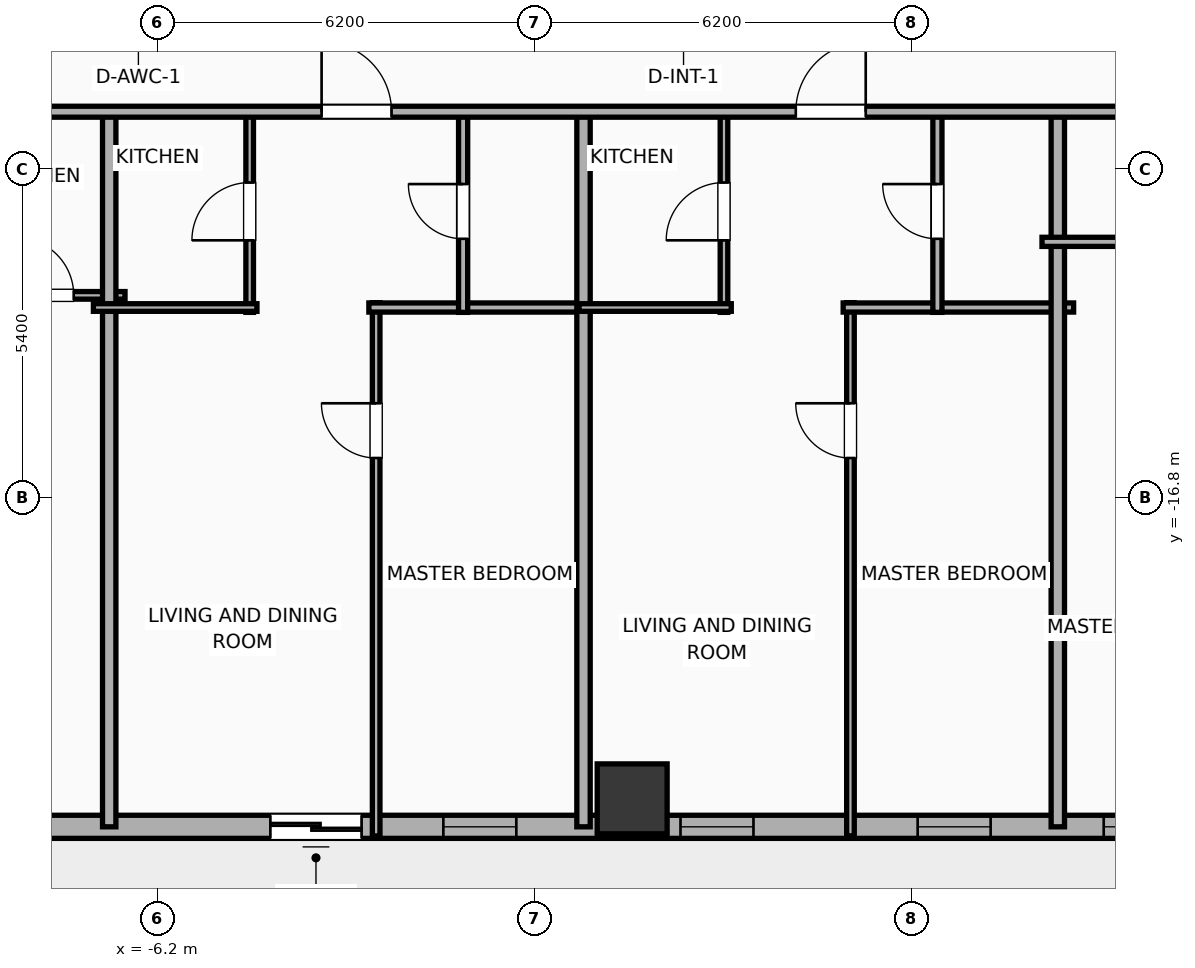
"""IFC4 building model, lengths in metres.
Left out: names, types, materials, properties, quantities, classifications, styles, units other than length and angle.
Written with IfcOpenShell. Run it as: python <this file> out.ifc"""

import sys

from ifc_helpers import new_model, si_unit, direction, frame, frame_2d, origin, origin_2d, place, context, subcontext, project, spatial, rectangle, hollow_rectangle, extrude, element, fill, save


model = new_model("IFC4")
c1 = context("Model", 3, precision=1e-05, world=origin(), true_north=direction((0.0, 1.0)))
c2 = subcontext(c1, "Body", "Model", "MODEL_VIEW")
j1 = project(units=[si_unit("LENGTHUNIT", "METRE"), si_unit("PLANEANGLEUNIT", "RADIAN")], contexts=[c1])
p1 = place(None, origin())
s1 = spatial("IfcSite", under=j1, at=p1, CompositionType="ELEMENT")
p2 = place(p1, origin())
s2 = spatial("IfcBuilding", under=s1, at=p2, CompositionType="ELEMENT")
p3 = place(p2, frame((0.0, 0.0, 26.0)))
s3 = spatial("IfcBuildingStorey", under=s2, at=p3, CompositionType="ELEMENT", Elevation=26.0)
p4 = place(p3, frame((1.6, -21.75, -0.25), z_axis=(0.0, 0.0, 1.0), x_axis=(1.0, 0.0, 0.0)))
e1 = element("IfcColumn", 1, at=p4, inside=s3, PredefinedType="COLUMN", context=c2, shape_type="SweptSolid", body=[
    extrude(hollow_rectangle(XDim=1.15, YDim=1.15, WallThickness=0.04, at=origin_2d()), origin(), (0.0, 0.0, 1.0), 4.15),
])
p5 = place(p3, frame((22.381, -22.21, 0.0), z_axis=(0.0, 0.0, 1.0), x_axis=(-1.0, 0.0, 0.0)))
e2 = element("IfcWall", 2, at=p5, inside=s3, PredefinedType="ELEMENTEDWALL", context=c2, shape_type="SweptSolid", body=[
    extrude(rectangle(XDim=51.963, YDim=0.38, at=frame_2d((25.981, 0.0))), origin(), (0.0, 0.0, 1.0), 2.54),
])
p6 = place(p5, frame((25.231, 0.0, 0.0)))
e3 = element("IfcOpeningElement", 3, at=p6, cuts=e2, PredefinedType="OPENING", context=c2, shape_type="SweptSolid", body=[
    extrude(rectangle(XDim=1.5, YDim=2.05, at=frame_2d((0.75, 1.025))), frame((0.0, 0.2, 0.0), z_axis=(0.0, -1.0, 0.0), x_axis=(1.0, 0.0, 0.0)), (0.0, 0.0, 1.0), 0.4),
])
p7 = place(p5, frame((6.61, 0.0, 0.75)))
e4 = element("IfcOpeningElement", 4, at=p7, cuts=e2, PredefinedType="OPENING", context=c2, shape_type="SweptSolid", body=[
    extrude(rectangle(XDim=2.4, YDim=1.63, at=frame_2d((1.2, 0.815))), frame((0.0, 0.2, 0.0), z_axis=(0.0, -1.0, 0.0), x_axis=(1.0, 0.0, 0.0)), (0.0, 0.0, 1.0), 0.4),
])
p8 = place(p5, frame((49.132, 0.0, 0.75)))
e5 = element("IfcOpeningElement", 5, at=p8, cuts=e2, PredefinedType="OPENING", context=c2, shape_type="SweptSolid", body=[
    extrude(rectangle(XDim=1.2, YDim=1.63, at=frame_2d((0.6, 0.815))), frame((0.0, 0.2, 0.0), z_axis=(0.0, -1.0, 0.0), x_axis=(1.0, 0.0, 0.0)), (0.0, 0.0, 1.0), 0.4),
])
p9 = place(p5, frame((46.086, 0.0, 0.75)))
e6 = element("IfcOpeningElement", 6, at=p9, cuts=e2, PredefinedType="OPENING", context=c2, shape_type="SweptSolid", body=[
    extrude(rectangle(XDim=1.2, YDim=1.63, at=frame_2d((0.6, 0.815))), frame((0.0, 0.2, 0.0), z_axis=(0.0, -1.0, 0.0), x_axis=(1.0, 0.0, 0.0)), (0.0, 0.0, 1.0), 0.4),
])
p10 = place(p5, frame((42.426, 0.0, 0.75)))
e7 = element("IfcOpeningElement", 7, at=p10, cuts=e2, PredefinedType="OPENING", context=c2, shape_type="SweptSolid", body=[
    extrude(rectangle(XDim=1.2, YDim=1.63, at=frame_2d((0.6, 0.815))), frame((0.0, 0.2, 0.0), z_axis=(0.0, -1.0, 0.0), x_axis=(1.0, 0.0, 0.0)), (0.0, 0.0, 1.0), 0.4),
])
p11 = place(p5, frame((38.286, 0.0, 0.75)))
e8 = element("IfcOpeningElement", 8, at=p11, cuts=e2, PredefinedType="OPENING", context=c2, shape_type="SweptSolid", body=[
    extrude(rectangle(XDim=1.2, YDim=1.63, at=frame_2d((0.6, 0.815))), frame((0.0, 0.2, 0.0), z_axis=(0.0, -1.0, 0.0), x_axis=(1.0, 0.0, 0.0)), (0.0, 0.0, 1.0), 0.4),
])
p12 = place(p5, frame((35.219, 0.0, 0.75)))
e9 = element("IfcOpeningElement", 9, at=p12, cuts=e2, PredefinedType="OPENING", context=c2, shape_type="SweptSolid", body=[
    extrude(rectangle(XDim=1.2, YDim=1.63, at=frame_2d((0.6, 0.815))), frame((0.0, 0.2, 0.0), z_axis=(0.0, -1.0, 0.0), x_axis=(1.0, 0.0, 0.0)), (0.0, 0.0, 1.0), 0.4),
])
p13 = place(p5, frame((32.039, 0.0, 0.75)))
e10 = element("IfcOpeningElement", 10, at=p13, cuts=e2, PredefinedType="OPENING", context=c2, shape_type="SweptSolid", body=[
    extrude(rectangle(XDim=1.2, YDim=1.63, at=frame_2d((0.6, 0.815))), frame((0.0, 0.2, 0.0), z_axis=(0.0, -1.0, 0.0), x_axis=(1.0, 0.0, 0.0)), (0.0, 0.0, 1.0), 0.4),
])
p14 = place(p5, frame((22.686, 0.0, 0.75)))
e11 = element("IfcOpeningElement", 11, at=p14, cuts=e2, PredefinedType="OPENING", context=c2, shape_type="SweptSolid", body=[
    extrude(rectangle(XDim=1.2, YDim=1.63, at=frame_2d((0.6, 0.815))), frame((0.0, 0.2, 0.0), z_axis=(0.0, -1.0, 0.0), x_axis=(1.0, 0.0, 0.0)), (0.0, 0.0, 1.0), 0.4),
])
p15 = place(p5, frame((18.786, 0.0, 0.75)))
e12 = element("IfcOpeningElement", 12, at=p15, cuts=e2, PredefinedType="OPENING", context=c2, shape_type="SweptSolid", body=[
    extrude(rectangle(XDim=1.2, YDim=1.63, at=frame_2d((0.6, 0.815))), frame((0.0, 0.2, 0.0), z_axis=(0.0, -1.0, 0.0), x_axis=(1.0, 0.0, 0.0)), (0.0, 0.0, 1.0), 0.4),
])
p16 = place(p5, frame((14.886, 0.0, 0.75)))
e13 = element("IfcOpeningElement", 13, at=p16, cuts=e2, PredefinedType="OPENING", context=c2, shape_type="SweptSolid", body=[
    extrude(rectangle(XDim=1.2, YDim=1.63, at=frame_2d((0.6, 0.815))), frame((0.0, 0.2, 0.0), z_axis=(0.0, -1.0, 0.0), x_axis=(1.0, 0.0, 0.0)), (0.0, 0.0, 1.0), 0.4),
])
p17 = place(p5, frame((11.826, 0.0, 0.75)))
e14 = element("IfcOpeningElement", 14, at=p17, cuts=e2, PredefinedType="OPENING", context=c2, shape_type="SweptSolid", body=[
    extrude(rectangle(XDim=1.2, YDim=1.63, at=frame_2d((0.6, 0.815))), frame((0.0, 0.2, 0.0), z_axis=(0.0, -1.0, 0.0), x_axis=(1.0, 0.0, 0.0)), (0.0, 0.0, 1.0), 0.4),
])
p18 = place(p5, frame((2.836, 0.0, 0.75)))
e15 = element("IfcOpeningElement", 15, at=p18, cuts=e2, PredefinedType="OPENING", context=c2, shape_type="SweptSolid", body=[
    extrude(rectangle(XDim=1.2, YDim=1.63, at=frame_2d((0.6, 0.815))), frame((0.0, 0.2, 0.0), z_axis=(0.0, -1.0, 0.0), x_axis=(1.0, 0.0, 0.0)), (0.0, 0.0, 1.0), 0.4),
])
p19 = place(p3, frame((-9.377, -13.47, 0.0), z_axis=(0.0, 0.0, 1.0), x_axis=(1.0, 0.0, 0.0)))
e16 = element("IfcWall", 16, at=p19, inside=s3, PredefinedType="PARTITIONING", context=c2, shape_type="SweptSolid", body=[
    extrude(rectangle(XDim=2.637, YDim=0.125, at=frame_2d((1.318, 0.0))), origin(), (0.0, 0.0, 1.0), 3.65),
])
p20 = place(p19, frame((0.844, 0.0, 0.0)))
e17 = element("IfcOpeningElement", 17, at=p20, cuts=e16, PredefinedType="OPENING", context=c2, shape_type="SweptSolid", body=[
    extrude(rectangle(XDim=0.95, YDim=2.05, at=frame_2d((0.475, 1.025))), frame((0.0, 0.073, 0.0), z_axis=(0.0, -1.0, 0.0), x_axis=(1.0, 0.0, 0.0)), (0.0, 0.0, 1.0), 0.145),
])
p21 = place(p3, frame((-7.0, -22.21, 0.0), z_axis=(0.0, 0.0, 1.0), x_axis=(0.0, 1.0, 0.0)))
e18 = element("IfcWall", 18, at=p21, inside=s3, PredefinedType="PARTITIONING", context=c2, shape_type="SweptSolid", body=[
    extrude(rectangle(XDim=11.84, YDim=0.22, at=frame_2d((5.92, 0.0))), origin(), (0.0, 0.0, 1.0), 3.65),
])
p22 = place(p3, frame((-2.61, -22.36, 0.0), z_axis=(0.0, 0.0, 1.0), x_axis=(0.0, 1.0, 0.0)))
e19 = element("IfcWall", 19, at=p22, inside=s3, PredefinedType="PARTITIONING", context=c2, shape_type="SweptSolid", body=[
    extrude(rectangle(XDim=8.77, YDim=0.125, at=frame_2d((4.385, 0.0))), origin(), (0.0, 0.0, 1.0), 3.65),
])
p23 = place(p22, frame((6.215, 0.0, 0.0)))
e20 = element("IfcOpeningElement", 20, at=p23, cuts=e19, PredefinedType="OPENING", context=c2, shape_type="SweptSolid", body=[
    extrude(rectangle(XDim=0.9, YDim=2.05, at=frame_2d((0.45, 1.025))), frame((0.0, 0.073, 0.0), z_axis=(0.0, -1.0, 0.0), x_axis=(1.0, 0.0, 0.0)), (0.0, 0.0, 1.0), 0.145),
])
p24 = place(p3, frame((-2.73, -13.67, 0.0), z_axis=(0.0, 0.0, 1.0), x_axis=(1.0, 0.0, 0.0)))
e21 = element("IfcWall", 21, at=p24, inside=s3, PredefinedType="PLUMBINGWALL", context=c2, shape_type="SweptSolid", body=[
    extrude(rectangle(XDim=3.605, YDim=0.15, at=frame_2d((1.802, 0.0))), origin(), (0.0, 0.0, 1.0), 3.65),
])
p25 = place(p3, frame((-4.69, -13.75, 0.0), z_axis=(0.0, 0.0, 1.0), x_axis=(0.0, 1.0, 0.0)))
e22 = element("IfcWall", 22, at=p25, inside=s3, PredefinedType="PARTITIONING", context=c2, shape_type="SweptSolid", body=[
    extrude(rectangle(XDim=3.32, YDim=0.125, at=frame_2d((1.66, 0.0))), origin(), (0.0, 0.0, 1.0), 3.65),
])
p26 = place(p25, frame((1.185, 0.0, 0.0)))
e23 = element("IfcOpeningElement", 23, at=p26, cuts=e22, PredefinedType="OPENING", context=c2, shape_type="SweptSolid", body=[
    extrude(rectangle(XDim=0.95, YDim=2.05, at=frame_2d((0.475, 1.025))), frame((0.0, 0.073, 0.0), z_axis=(0.0, -1.0, 0.0), x_axis=(1.0, 0.0, 0.0)), (0.0, 0.0, 1.0), 0.145),
])
p27 = place(p3, frame((-7.26, -13.67, 0.0), z_axis=(0.0, 0.0, 1.0), x_axis=(1.0, 0.0, 0.0)))
e24 = element("IfcWall", 24, at=p27, inside=s3, PredefinedType="PARTITIONING", context=c2, shape_type="SweptSolid", body=[
    extrude(rectangle(XDim=2.69, YDim=0.125, at=frame_2d((1.345, 0.0))), origin(), (0.0, 0.0, 1.0), 3.65),
])
p28 = place(p3, frame((-1.18, -13.75, 0.0), z_axis=(0.0, 0.0, 1.0), x_axis=(0.0, 1.0, 0.0)))
e25 = element("IfcWall", 25, at=p28, inside=s3, PredefinedType="PLUMBINGWALL", context=c2, shape_type="SweptSolid", body=[
    extrude(rectangle(XDim=3.32, YDim=0.15, at=frame_2d((1.66, 0.0))), origin(), (0.0, 0.0, 1.0), 3.65),
])
p29 = place(p28, frame((1.21, 0.0, 0.0)))
e26 = element("IfcOpeningElement", 26, at=p29, cuts=e25, PredefinedType="OPENING", context=c2, shape_type="SweptSolid", body=[
    extrude(rectangle(XDim=0.9, YDim=2.05, at=frame_2d((0.45, 1.025))), frame((0.0, 0.085, 0.0), z_axis=(0.0, -1.0, 0.0), x_axis=(1.0, 0.0, 0.0)), (0.0, 0.0, 1.0), 0.17),
])
p30 = place(p3, frame((0.8, -22.21, 0.0), z_axis=(0.0, 0.0, 1.0), x_axis=(0.0, 1.0, 0.0)))
e27 = element("IfcWall", 27, at=p30, inside=s3, PredefinedType="PARTITIONING", context=c2, shape_type="SweptSolid", body=[
    extrude(rectangle(XDim=11.84, YDim=0.22, at=frame_2d((5.92, 0.0))), origin(), (0.0, 0.0, 1.0), 3.65),
])
p31 = place(p3, frame((5.19, -22.36, 0.0), z_axis=(0.0, 0.0, 1.0), x_axis=(0.0, 1.0, 0.0)))
e28 = element("IfcWall", 28, at=p31, inside=s3, PredefinedType="PARTITIONING", context=c2, shape_type="SweptSolid", body=[
    extrude(rectangle(XDim=8.77, YDim=0.125, at=frame_2d((4.385, 0.0))), origin(), (0.0, 0.0, 1.0), 3.65),
])
p32 = place(p31, frame((6.215, 0.0, 0.0)))
e29 = element("IfcOpeningElement", 29, at=p32, cuts=e28, PredefinedType="OPENING", context=c2, shape_type="SweptSolid", body=[
    extrude(rectangle(XDim=0.9, YDim=2.05, at=frame_2d((0.45, 1.025))), frame((0.0, 0.073, 0.0), z_axis=(0.0, -1.0, 0.0), x_axis=(1.0, 0.0, 0.0)), (0.0, 0.0, 1.0), 0.145),
])
p33 = place(p3, frame((5.07, -13.67, 0.0), z_axis=(0.0, 0.0, 1.0), x_axis=(1.0, 0.0, 0.0)))
e30 = element("IfcWall", 30, at=p33, inside=s3, PredefinedType="PLUMBINGWALL", context=c2, shape_type="SweptSolid", body=[
    extrude(rectangle(XDim=3.79, YDim=0.15, at=frame_2d((1.895, 0.0))), origin(), (0.0, 0.0, 1.0), 3.65),
])
p34 = place(p3, frame((3.11, -13.75, 0.0), z_axis=(0.0, 0.0, 1.0), x_axis=(0.0, 1.0, 0.0)))
e31 = element("IfcWall", 31, at=p34, inside=s3, PredefinedType="PARTITIONING", context=c2, shape_type="SweptSolid", body=[
    extrude(rectangle(XDim=3.32, YDim=0.125, at=frame_2d((1.66, 0.0))), origin(), (0.0, 0.0, 1.0), 2.54),
])
p35 = place(p34, frame((1.185, 0.0, 0.0)))
e32 = element("IfcOpeningElement", 32, at=p35, cuts=e31, PredefinedType="OPENING", context=c2, shape_type="SweptSolid", body=[
    extrude(rectangle(XDim=0.95, YDim=2.05, at=frame_2d((0.475, 1.025))), frame((0.0, 0.073, 0.0), z_axis=(0.0, -1.0, 0.0), x_axis=(1.0, 0.0, 0.0)), (0.0, 0.0, 1.0), 0.145),
])
p36 = place(p3, frame((0.725, -13.67, 0.0), z_axis=(0.0, 0.0, 1.0), x_axis=(1.0, 0.0, 0.0)))
e33 = element("IfcWall", 33, at=p36, inside=s3, PredefinedType="PARTITIONING", context=c2, shape_type="SweptSolid", body=[
    extrude(rectangle(XDim=2.505, YDim=0.125, at=frame_2d((1.252, 0.0))), origin(), (0.0, 0.0, 1.0), 3.65),
])
p37 = place(p3, frame((6.62, -13.75, 0.0), z_axis=(0.0, 0.0, 1.0), x_axis=(0.0, 1.0, 0.0)))
e34 = element("IfcWall", 34, at=p37, inside=s3, PredefinedType="PLUMBINGWALL", context=c2, shape_type="SweptSolid", body=[
    extrude(rectangle(XDim=3.32, YDim=0.15, at=frame_2d((1.66, 0.0))), origin(), (0.0, 0.0, 1.0), 3.65),
])
p38 = place(p37, frame((1.21, 0.0, 0.0)))
e35 = element("IfcOpeningElement", 35, at=p38, cuts=e34, PredefinedType="OPENING", context=c2, shape_type="SweptSolid", body=[
    extrude(rectangle(XDim=0.9, YDim=2.05, at=frame_2d((0.45, 1.025))), frame((0.0, 0.085, 0.0), z_axis=(0.0, -1.0, 0.0), x_axis=(1.0, 0.0, 0.0)), (0.0, 0.0, 1.0), 0.17),
])
p39 = place(p3, frame((8.6, -22.21, 0.0), z_axis=(0.0, 0.0, 1.0), x_axis=(0.0, 1.0, 0.0)))
e36 = element("IfcWall", 36, at=p39, inside=s3, PredefinedType="PARTITIONING", context=c2, shape_type="SweptSolid", body=[
    extrude(rectangle(XDim=11.84, YDim=0.22, at=frame_2d((5.92, 0.0))), origin(), (0.0, 0.0, 1.0), 3.65),
])
p40 = place(p3, frame((8.34, -12.59, 0.0), z_axis=(0.0, 0.0, 1.0), x_axis=(1.0, 0.0, 0.0)))
e37 = element("IfcWall", 37, at=p40, inside=s3, PredefinedType="PLUMBINGWALL", context=c2, shape_type="SweptSolid", body=[
    extrude(rectangle(XDim=3.05, YDim=0.15, at=frame_2d((1.525, 0.0))), origin(), (0.0, 0.0, 1.0), 3.65),
])
p41 = place(p3, frame((-33.41, -10.45, 0.0), z_axis=(0.0, 0.0, 1.0), x_axis=(1.0, 0.0, 0.0)))
e38 = element("IfcWall", 38, at=p41, inside=s3, PredefinedType="PARTITIONING", context=c2, shape_type="SweptSolid", body=[
    extrude(rectangle(XDim=59.62, YDim=0.18, at=frame_2d((29.81, 0.0))), origin(), (0.0, 0.0, 1.0), 3.65),
])
p42 = place(p41, frame((5.321, 0.0, 0.0)))
e39 = element("IfcOpeningElement", 39, at=p42, cuts=e38, PredefinedType="OPENING", context=c2, shape_type="SweptSolid", body=[
    extrude(rectangle(XDim=1.15, YDim=2.05, at=frame_2d((0.575, 1.025))), frame((0.0, 0.1, 0.0), z_axis=(0.0, -1.0, 0.0), x_axis=(1.0, 0.0, 0.0)), (0.0, 0.0, 1.0), 0.2),
])
p43 = place(p41, frame((14.3, 0.0, 0.0)))
e40 = element("IfcOpeningElement", 40, at=p43, cuts=e38, PredefinedType="OPENING", context=c2, shape_type="SweptSolid", body=[
    extrude(rectangle(XDim=1.15, YDim=2.05, at=frame_2d((0.575, 1.025))), frame((0.0, 0.1, 0.0), z_axis=(0.0, -1.0, 0.0), x_axis=(1.0, 0.0, 0.0)), (0.0, 0.0, 1.0), 0.2),
])
p44 = place(p41, frame((22.265, 0.0, 0.0)))
e41 = element("IfcOpeningElement", 41, at=p44, cuts=e38, PredefinedType="OPENING", context=c2, shape_type="SweptSolid", body=[
    extrude(rectangle(XDim=0.9, YDim=2.05, at=frame_2d((0.45, 1.025))), frame((0.0, 0.1, 0.0), z_axis=(0.0, -1.0, 0.0), x_axis=(1.0, 0.0, 0.0)), (0.0, 0.0, 1.0), 0.2),
])
p45 = place(p41, frame((29.903, 0.0, 0.0)))
e42 = element("IfcOpeningElement", 42, at=p45, cuts=e38, PredefinedType="OPENING", context=c2, shape_type="SweptSolid", body=[
    extrude(rectangle(XDim=1.15, YDim=2.05, at=frame_2d((0.575, 1.025))), frame((0.0, 0.1, 0.0), z_axis=(0.0, -1.0, 0.0), x_axis=(1.0, 0.0, 0.0)), (0.0, 0.0, 1.0), 0.2),
])
p46 = place(p41, frame((37.701, 0.0, 0.0)))
e43 = element("IfcOpeningElement", 43, at=p46, cuts=e38, PredefinedType="OPENING", context=c2, shape_type="SweptSolid", body=[
    extrude(rectangle(XDim=1.15, YDim=2.05, at=frame_2d((0.575, 1.025))), frame((0.0, 0.1, 0.0), z_axis=(0.0, -1.0, 0.0), x_axis=(1.0, 0.0, 0.0)), (0.0, 0.0, 1.0), 0.2),
])
p47 = place(p41, frame((45.654, 0.0, 0.0)))
e44 = element("IfcOpeningElement", 44, at=p47, cuts=e38, PredefinedType="OPENING", context=c2, shape_type="SweptSolid", body=[
    extrude(rectangle(XDim=0.9, YDim=2.05, at=frame_2d((0.45, 1.025))), frame((0.0, 0.1, 0.0), z_axis=(0.0, -1.0, 0.0), x_axis=(1.0, 0.0, 0.0)), (0.0, 0.0, 1.0), 0.2),
])
p48 = place(p41, frame((54.472, 0.0, 0.0)))
e45 = element("IfcOpeningElement", 45, at=p48, cuts=e38, PredefinedType="OPENING", context=c2, shape_type="SweptSolid", body=[
    extrude(rectangle(XDim=1.15, YDim=2.05, at=frame_2d((0.575, 1.025))), frame((0.0, 0.1, 0.0), z_axis=(0.0, -1.0, 0.0), x_axis=(1.0, 0.0, 0.0)), (0.0, 0.0, 1.0), 0.2),
])
p49 = place(p6, origin())
e46 = element("IfcDoor", 46, at=p49, inside=s3, OperationType="SLIDING_TO_RIGHT", PredefinedType="DOOR", context=c2, shape_type="SweptSolid", body=[
    extrude(rectangle(XDim=1.5, YDim=2.05, at=frame_2d((0.75, 1.025))), frame((0.0, 0.025, 0.0), z_axis=(0.0, -1.0, 0.0), x_axis=(1.0, 0.0, 0.0)), (0.0, 0.0, 1.0), 0.05),
])
fill(e3, e46)
p50 = place(p14, origin())
e47 = element("IfcWindow", 47, at=p50, inside=s3, PartitioningType="SINGLE_PANEL", PredefinedType="WINDOW", context=c2, shape_type="SweptSolid", body=[
    extrude(rectangle(XDim=1.2, YDim=1.63, at=frame_2d((0.6, 0.815))), frame((0.0, 0.03, 0.0), z_axis=(0.0, -1.0, 0.0), x_axis=(1.0, 0.0, 0.0)), (0.0, 0.0, 1.0), 0.06),
])
fill(e11, e47)
p51 = place(p15, origin())
e48 = element("IfcWindow", 48, at=p51, inside=s3, PartitioningType="SINGLE_PANEL", PredefinedType="WINDOW", context=c2, shape_type="SweptSolid", body=[
    extrude(rectangle(XDim=1.2, YDim=1.63, at=frame_2d((0.6, 0.815))), frame((0.0, 0.03, 0.0), z_axis=(0.0, -1.0, 0.0), x_axis=(1.0, 0.0, 0.0)), (0.0, 0.0, 1.0), 0.06),
])
fill(e12, e48)
p52 = place(p16, origin())
e49 = element("IfcWindow", 49, at=p52, inside=s3, PartitioningType="SINGLE_PANEL", PredefinedType="WINDOW", context=c2, shape_type="SweptSolid", body=[
    extrude(rectangle(XDim=1.2, YDim=1.63, at=frame_2d((0.6, 0.815))), frame((0.0, 0.03, 0.0), z_axis=(0.0, -1.0, 0.0), x_axis=(1.0, 0.0, 0.0)), (0.0, 0.0, 1.0), 0.06),
])
fill(e13, e49)
p53 = place(p17, origin())
e50 = element("IfcWindow", 50, at=p53, inside=s3, PartitioningType="SINGLE_PANEL", PredefinedType="WINDOW", context=c2, shape_type="SweptSolid", body=[
    extrude(rectangle(XDim=1.2, YDim=1.63, at=frame_2d((0.6, 0.815))), frame((0.0, 0.03, 0.0), z_axis=(0.0, -1.0, 0.0), x_axis=(1.0, 0.0, 0.0)), (0.0, 0.0, 1.0), 0.06),
])
fill(e14, e50)
p54 = place(p20, origin())
e51 = element("IfcDoor", 51, at=p54, inside=s3, OperationType="SINGLE_SWING_LEFT", PredefinedType="DOOR", context=c2, shape_type="SweptSolid", body=[
    extrude(rectangle(XDim=0.95, YDim=2.05, at=frame_2d((0.475, 1.025))), frame((0.0, 0.025, 0.0), z_axis=(0.0, -1.0, 0.0), x_axis=(1.0, 0.0, 0.0)), (0.0, 0.0, 1.0), 0.05),
])
fill(e17, e51)
p55 = place(p23, origin())
e52 = element("IfcDoor", 52, at=p55, inside=s3, OperationType="SINGLE_SWING_RIGHT", PredefinedType="DOOR", context=c2, shape_type="SweptSolid", body=[
    extrude(rectangle(XDim=0.9, YDim=2.05, at=frame_2d((0.45, 1.025))), frame((0.0, 0.025, 0.0), z_axis=(0.0, -1.0, 0.0), x_axis=(1.0, 0.0, 0.0)), (0.0, 0.0, 1.0), 0.05),
])
fill(e20, e52)
p56 = place(p26, origin())
e53 = element("IfcDoor", 53, at=p56, inside=s3, OperationType="SINGLE_SWING_LEFT", PredefinedType="DOOR", context=c2, shape_type="SweptSolid", body=[
    extrude(rectangle(XDim=0.95, YDim=2.05, at=frame_2d((0.475, 1.025))), frame((0.0, 0.025, 0.0), z_axis=(0.0, -1.0, 0.0), x_axis=(1.0, 0.0, 0.0)), (0.0, 0.0, 1.0), 0.05),
])
fill(e23, e53)
p57 = place(p29, origin())
e54 = element("IfcDoor", 54, at=p57, inside=s3, OperationType="SINGLE_SWING_RIGHT", PredefinedType="DOOR", context=c2, shape_type="SweptSolid", body=[
    extrude(rectangle(XDim=0.9, YDim=2.05, at=frame_2d((0.45, 1.025))), frame((0.0, 0.025, 0.0), z_axis=(0.0, -1.0, 0.0), x_axis=(1.0, 0.0, 0.0)), (0.0, 0.0, 1.0), 0.05),
])
fill(e26, e54)
p58 = place(p32, origin())
e55 = element("IfcDoor", 55, at=p58, inside=s3, OperationType="SINGLE_SWING_RIGHT", PredefinedType="DOOR", context=c2, shape_type="SweptSolid", body=[
    extrude(rectangle(XDim=0.9, YDim=2.05, at=frame_2d((0.45, 1.025))), frame((0.0, 0.025, 0.0), z_axis=(0.0, -1.0, 0.0), x_axis=(1.0, 0.0, 0.0)), (0.0, 0.0, 1.0), 0.05),
])
fill(e29, e55)
p59 = place(p35, origin())
e56 = element("IfcDoor", 56, at=p59, inside=s3, OperationType="SINGLE_SWING_LEFT", PredefinedType="DOOR", context=c2, shape_type="SweptSolid", body=[
    extrude(rectangle(XDim=0.95, YDim=2.05, at=frame_2d((0.475, 1.025))), frame((0.0, 0.025, 0.0), z_axis=(0.0, -1.0, 0.0), x_axis=(1.0, 0.0, 0.0)), (0.0, 0.0, 1.0), 0.05),
])
fill(e32, e56)
p60 = place(p38, origin())
e57 = element("IfcDoor", 57, at=p60, inside=s3, OperationType="SINGLE_SWING_RIGHT", PredefinedType="DOOR", context=c2, shape_type="SweptSolid", body=[
    extrude(rectangle(XDim=0.9, YDim=2.05, at=frame_2d((0.45, 1.025))), frame((0.0, 0.025, 0.0), z_axis=(0.0, -1.0, 0.0), x_axis=(1.0, 0.0, 0.0)), (0.0, 0.0, 1.0), 0.05),
])
fill(e35, e57)
p61 = place(p45, origin())
e58 = element("IfcDoor", 58, at=p61, inside=s3, OperationType="SINGLE_SWING_LEFT", PredefinedType="DOOR", context=c2, shape_type="SweptSolid", body=[
    extrude(rectangle(XDim=1.15, YDim=2.05, at=frame_2d((0.575, 1.025))), frame((0.0, 0.025, 0.0), z_axis=(0.0, -1.0, 0.0), x_axis=(1.0, 0.0, 0.0)), (0.0, 0.0, 1.0), 0.05),
])
fill(e42, e58)
p62 = place(p46, origin())
e59 = element("IfcDoor", 59, at=p62, inside=s3, OperationType="SINGLE_SWING_RIGHT", PredefinedType="DOOR", context=c2, shape_type="SweptSolid", body=[
    extrude(rectangle(XDim=1.15, YDim=2.05, at=frame_2d((0.575, 1.025))), frame((0.0, 0.025, 0.0), z_axis=(0.0, -1.0, 0.0), x_axis=(1.0, 0.0, 0.0)), (0.0, 0.0, 1.0), 0.05),
])
fill(e43, e59)
save(model, sys.argv[1])
